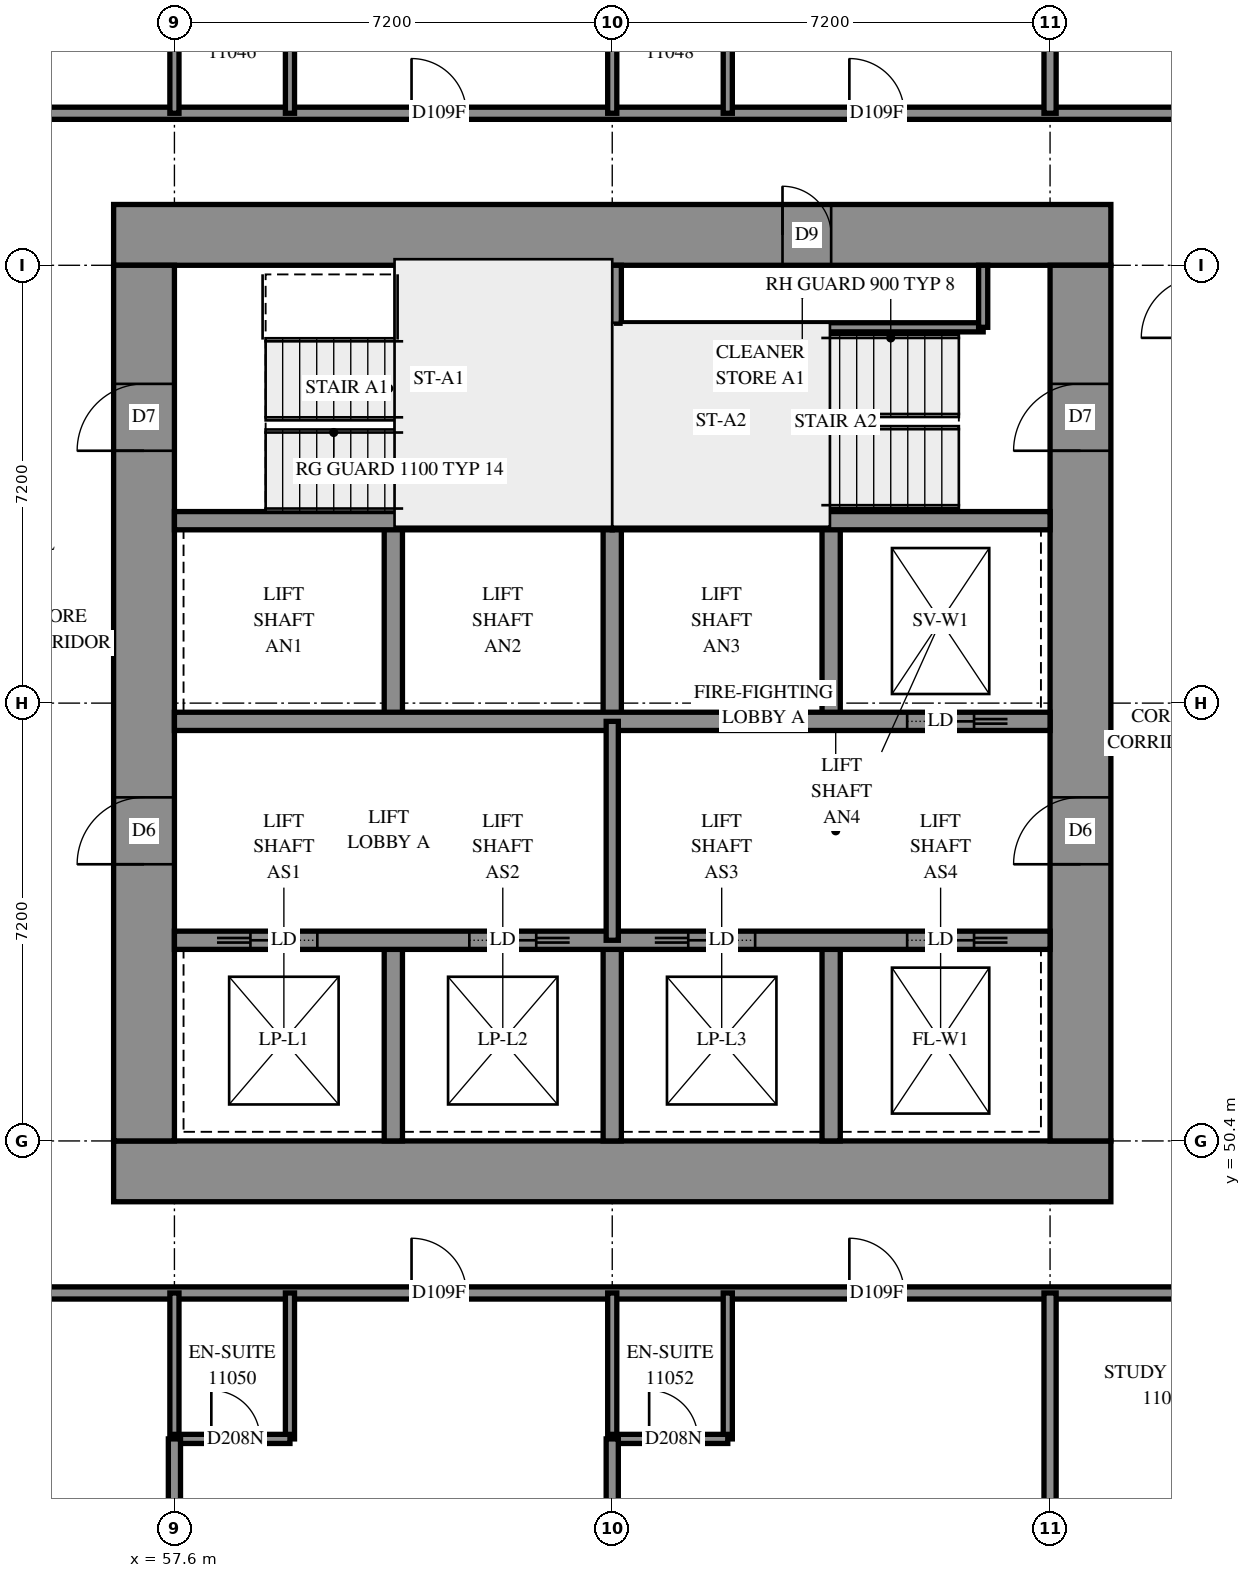
"""IFC4 building model, lengths in metres.
Left out: names, types, materials, properties, quantities, classifications, styles, units other than length and angle.
Written with IfcOpenShell. Run it as: python <this file> out.ifc"""

import sys

from ifc_helpers import new_model, si_unit, direction, frame, frame_2d, origin, place, context, subcontext, project, spatial, rectangle, extrude, element, fill, save


model = new_model("IFC4")
c1 = context("Model", 3, precision=1e-05, world=origin(), true_north=direction((0.0, 1.0)))
c2 = subcontext(c1, "Body", "Model", "MODEL_VIEW")
j1 = project(units=[si_unit("LENGTHUNIT", "METRE"), si_unit("PLANEANGLEUNIT", "RADIAN")], contexts=[c1])
p1 = place(None, origin())
s1 = spatial("IfcSite", under=j1, at=p1, CompositionType="ELEMENT")
p2 = place(p1, origin())
s2 = spatial("IfcBuilding", under=s1, at=p2, CompositionType="ELEMENT")
p3 = place(p2, frame((0.0, 0.0, 44.0)))
s3 = spatial("IfcBuildingStorey", under=s2, at=p3, CompositionType="ELEMENT", Elevation=44.0)
p4 = place(p3, frame((56.6, 49.9, -0.3), z_axis=(0.0, 0.0, 1.0), x_axis=(1.0, 0.0, 0.0)))
e1 = element("IfcWall", 1, at=p4, inside=s3, PredefinedType="SHEAR", context=c2, shape_type="SweptSolid", body=[
    extrude(rectangle(XDim=16.4, YDim=1.0, at=frame_2d((8.2, 0.0))), origin(), (0.0, 0.0, 1.0), 2.7),
])
p5 = place(p3, frame((56.6, 65.3, -0.3), z_axis=(0.0, 0.0, 1.0), x_axis=(1.0, 0.0, 0.0)))
e2 = element("IfcWall", 2, at=p5, inside=s3, PredefinedType="SHEAR", context=c2, shape_type="SweptSolid", body=[
    extrude(rectangle(XDim=16.4, YDim=1.0, at=frame_2d((8.2, 0.0))), origin(), (0.0, 0.0, 1.0), 2.7),
])
p6 = place(p5, frame((11.0, 0.0, 0.3)))
e3 = element("IfcOpeningElement", 3, at=p6, cuts=e2, PredefinedType="OPENING", context=c2, shape_type="SweptSolid", body=[
    extrude(rectangle(XDim=0.8, YDim=2.1, at=frame_2d((0.4, 1.05))), frame((0.0, 0.51, 0.0), z_axis=(0.0, -1.0, 0.0), x_axis=(1.0, 0.0, 0.0)), (0.0, 0.0, 1.0), 1.02),
])
p7 = place(p3, frame((57.1, 50.4, -0.3), z_axis=(0.0, 0.0, 1.0), x_axis=(0.0, 1.0, 0.0)))
e4 = element("IfcWall", 4, at=p7, inside=s3, PredefinedType="SHEAR", context=c2, shape_type="SweptSolid", body=[
    extrude(rectangle(XDim=14.4, YDim=1.0, at=frame_2d((7.2, 0.0))), origin(), (0.0, 0.0, 1.0), 2.7),
])
p8 = place(p7, frame((4.55, 0.0, 0.3)))
e5 = element("IfcOpeningElement", 5, at=p8, cuts=e4, PredefinedType="OPENING", context=c2, shape_type="SweptSolid", body=[
    extrude(rectangle(XDim=1.1, YDim=2.1, at=frame_2d((0.55, 1.05))), frame((0.0, 0.51, 0.0), z_axis=(0.0, -1.0, 0.0), x_axis=(1.0, 0.0, 0.0)), (0.0, 0.0, 1.0), 1.02),
])
p9 = place(p7, frame((11.35, 0.0, 0.3)))
e6 = element("IfcOpeningElement", 6, at=p9, cuts=e4, PredefinedType="OPENING", context=c2, shape_type="SweptSolid", body=[
    extrude(rectangle(XDim=1.1, YDim=2.1, at=frame_2d((0.55, 1.05))), frame((0.0, 0.51, 0.0), z_axis=(0.0, -1.0, 0.0), x_axis=(1.0, 0.0, 0.0)), (0.0, 0.0, 1.0), 1.02),
])
p10 = place(p3, frame((72.5, 50.4, -0.3), z_axis=(0.0, 0.0, 1.0), x_axis=(0.0, 1.0, 0.0)))
e7 = element("IfcWall", 7, at=p10, inside=s3, PredefinedType="SHEAR", context=c2, shape_type="SweptSolid", body=[
    extrude(rectangle(XDim=14.4, YDim=1.0, at=frame_2d((7.2, 0.0))), origin(), (0.0, 0.0, 1.0), 2.7),
])
p11 = place(p10, frame((4.55, 0.0, 0.3)))
e8 = element("IfcOpeningElement", 8, at=p11, cuts=e7, PredefinedType="OPENING", context=c2, shape_type="SweptSolid", body=[
    extrude(rectangle(XDim=1.1, YDim=2.1, at=frame_2d((0.55, 1.05))), frame((0.0, 0.51, 0.0), z_axis=(0.0, -1.0, 0.0), x_axis=(1.0, 0.0, 0.0)), (0.0, 0.0, 1.0), 1.02),
])
p12 = place(p10, frame((11.35, 0.0, 0.3)))
e9 = element("IfcOpeningElement", 9, at=p12, cuts=e7, PredefinedType="OPENING", context=c2, shape_type="SweptSolid", body=[
    extrude(rectangle(XDim=1.1, YDim=2.1, at=frame_2d((0.55, 1.05))), frame((0.0, 0.51, 0.0), z_axis=(0.0, -1.0, 0.0), x_axis=(1.0, 0.0, 0.0)), (0.0, 0.0, 1.0), 1.02),
])
for number, where, z_axis, x_axis in (
    (10, (61.2, 50.4, 0.0), (0.0, 0.0, 1.0), (0.0, 1.0, 0.0)),
    (11, (61.2, 57.3, 0.0), (0.0, 0.0, 1.0), (0.0, 1.0, 0.0)),
    (12, (64.8, 50.4, 0.0), (0.0, 0.0, 1.0), (0.0, 1.0, 0.0)),
    (13, (64.8, 57.3, 0.0), (0.0, 0.0, 1.0), (0.0, 1.0, 0.0)),
    (14, (68.4, 50.4, 0.0), (0.0, 0.0, 1.0), (0.0, 1.0, 0.0)),
    (15, (68.4, 57.3, 0.0), (0.0, 0.0, 1.0), (0.0, 1.0, 0.0)),
):
    element("IfcWall", number, at=place(p3, frame(where, z_axis=z_axis, x_axis=x_axis)), inside=s3, PredefinedType="SOLIDWALL", context=c2, shape_type="SweptSolid", body=[
        extrude(rectangle(XDim=3.3, YDim=0.3, at=frame_2d((1.65, 0.0))), origin(), (0.0, 0.0, 1.0), 3.1),
    ])
p13 = place(p3, frame((57.6, 53.7, 0.0), z_axis=(0.0, 0.0, 1.0), x_axis=(1.0, 0.0, 0.0)))
e16 = element("IfcWall", 16, at=p13, inside=s3, PredefinedType="SOLIDWALL", context=c2, shape_type="SweptSolid", body=[
    extrude(rectangle(XDim=14.4, YDim=0.3, at=frame_2d((7.2, 0.0))), origin(), (0.0, 0.0, 1.0), 3.1),
])
p14 = place(p13, frame((1.25, 0.0, 0.0)))
e17 = element("IfcOpeningElement", 17, at=p14, cuts=e16, PredefinedType="OPENING", context=c2, shape_type="SweptSolid", body=[
    extrude(rectangle(XDim=1.1, YDim=2.1, at=frame_2d((0.55, 1.05))), frame((0.0, 0.16, 0.0), z_axis=(0.0, -1.0, 0.0), x_axis=(1.0, 0.0, 0.0)), (0.0, 0.0, 1.0), 0.32),
])
p15 = place(p13, frame((4.85, 0.0, 0.0)))
e18 = element("IfcOpeningElement", 18, at=p15, cuts=e16, PredefinedType="OPENING", context=c2, shape_type="SweptSolid", body=[
    extrude(rectangle(XDim=1.1, YDim=2.1, at=frame_2d((0.55, 1.05))), frame((0.0, 0.16, 0.0), z_axis=(0.0, -1.0, 0.0), x_axis=(1.0, 0.0, 0.0)), (0.0, 0.0, 1.0), 0.32),
])
p16 = place(p13, frame((8.45, 0.0, 0.0)))
e19 = element("IfcOpeningElement", 19, at=p16, cuts=e16, PredefinedType="OPENING", context=c2, shape_type="SweptSolid", body=[
    extrude(rectangle(XDim=1.1, YDim=2.1, at=frame_2d((0.55, 1.05))), frame((0.0, 0.16, 0.0), z_axis=(0.0, -1.0, 0.0), x_axis=(1.0, 0.0, 0.0)), (0.0, 0.0, 1.0), 0.32),
])
p17 = place(p13, frame((12.05, 0.0, 0.0)))
e20 = element("IfcOpeningElement", 20, at=p17, cuts=e16, PredefinedType="OPENING", context=c2, shape_type="SweptSolid", body=[
    extrude(rectangle(XDim=1.1, YDim=2.1, at=frame_2d((0.55, 1.05))), frame((0.0, 0.16, 0.0), z_axis=(0.0, -1.0, 0.0), x_axis=(1.0, 0.0, 0.0)), (0.0, 0.0, 1.0), 0.32),
])
p18 = place(p3, frame((57.6, 57.3, 0.0), z_axis=(0.0, 0.0, 1.0), x_axis=(1.0, 0.0, 0.0)))
e21 = element("IfcWall", 21, at=p18, inside=s3, PredefinedType="SOLIDWALL", context=c2, shape_type="SweptSolid", body=[
    extrude(rectangle(XDim=14.4, YDim=0.3, at=frame_2d((7.2, 0.0))), origin(), (0.0, 0.0, 1.0), 3.1),
])
p19 = place(p18, frame((12.05, 0.0, 0.0)))
e22 = element("IfcOpeningElement", 22, at=p19, cuts=e21, PredefinedType="OPENING", context=c2, shape_type="SweptSolid", body=[
    extrude(rectangle(XDim=1.1, YDim=2.1, at=frame_2d((0.55, 1.05))), frame((0.0, 0.16, 0.0), z_axis=(0.0, -1.0, 0.0), x_axis=(1.0, 0.0, 0.0)), (0.0, 0.0, 1.0), 0.32),
])
for number, where, z_axis, x_axis in (
    (23, (57.6, 60.6, 0.0), (0.0, 0.0, 1.0), (1.0, 0.0, 0.0)),
    (24, (64.8, 60.6, 0.0), (0.0, 0.0, 1.0), (1.0, 0.0, 0.0)),
):
    element("IfcWall", number, at=place(p3, frame(where, z_axis=z_axis, x_axis=x_axis)), inside=s3, PredefinedType="SOLIDWALL", context=c2, shape_type="SweptSolid", body=[
        extrude(rectangle(XDim=7.2, YDim=0.3, at=frame_2d((3.6, 0.0))), origin(), (0.0, 0.0, 1.0), 3.1),
    ])
p20 = place(p3, frame((64.8, 60.6, 0.0), z_axis=(0.0, 0.0, 1.0), x_axis=(0.0, 1.0, 0.0)))
e25 = element("IfcWall", 25, at=p20, inside=s3, PredefinedType="SOLIDWALL", context=c2, shape_type="SweptSolid", body=[
    extrude(rectangle(XDim=4.2, YDim=0.3, at=frame_2d((2.1, 0.0))), origin(), (0.0, 0.0, 1.0), 3.1),
])
p21 = place(p3, frame((64.95, 63.78, 0.0), z_axis=(0.0, 0.0, 1.0), x_axis=(1.0, 0.0, 0.0)))
e26 = element("IfcWall", 26, at=p21, inside=s3, PredefinedType="PARTITIONING", context=c2, shape_type="SweptSolid", body=[
    extrude(rectangle(XDim=5.95, YDim=0.15, at=frame_2d((2.975, 0.0))), origin(), (0.0, 0.0, 1.0), 3.1),
])
p22 = place(p3, frame((70.9, 63.78, 0.0), z_axis=(0.0, 0.0, 1.0), x_axis=(0.0, 1.0, 0.0)))
e27 = element("IfcWall", 27, at=p22, inside=s3, PredefinedType="PARTITIONING", context=c2, shape_type="SweptSolid", body=[
    extrude(rectangle(XDim=1.02, YDim=0.15, at=frame_2d((0.51, 0.0))), origin(), (0.0, 0.0, 1.0), 3.1),
])
p23 = place(p3, frame((64.8, 53.7, 0.0), z_axis=(0.0, 0.0, 1.0), x_axis=(0.0, 1.0, 0.0)))
e28 = element("IfcWall", 28, at=p23, inside=s3, PredefinedType="PARTITIONING", context=c2, shape_type="SweptSolid", body=[
    extrude(rectangle(XDim=3.6, YDim=0.2, at=frame_2d((1.8, 0.0))), origin(), (0.0, 0.0, 1.0), 3.1),
])
p24 = place(p3, frame((55.1, 67.3, 0.0), z_axis=(0.0, 0.0, 1.0), x_axis=(1.0, 0.0, 0.0)))
e29 = element("IfcWall", 29, at=p24, inside=s3, PredefinedType="PARTITIONING", context=c2, shape_type="SweptSolid", body=[
    extrude(rectangle(XDim=19.4, YDim=0.2, at=frame_2d((9.7, 0.0))), origin(), (0.0, 0.0, 1.0), 3.1),
])
p25 = place(p24, frame((6.399, 0.0, 0.0)))
e30 = element("IfcOpeningElement", 30, at=p25, cuts=e29, PredefinedType="OPENING", context=c2, shape_type="SweptSolid", body=[
    extrude(rectangle(XDim=0.9, YDim=2.1, at=frame_2d((0.45, 1.05))), frame((0.0, 0.11, 0.0), z_axis=(0.0, -1.0, 0.0), x_axis=(1.0, 0.0, 0.0)), (0.0, 0.0, 1.0), 0.22),
])
p26 = place(p24, frame((13.599, 0.0, 0.0)))
e31 = element("IfcOpeningElement", 31, at=p26, cuts=e29, PredefinedType="OPENING", context=c2, shape_type="SweptSolid", body=[
    extrude(rectangle(XDim=0.9, YDim=2.1, at=frame_2d((0.45, 1.05))), frame((0.0, 0.11, 0.0), z_axis=(0.0, -1.0, 0.0), x_axis=(1.0, 0.0, 0.0)), (0.0, 0.0, 1.0), 0.22),
])
p27 = place(p3, frame((55.1, 47.9, 0.0), z_axis=(0.0, 0.0, 1.0), x_axis=(1.0, 0.0, 0.0)))
e32 = element("IfcWall", 32, at=p27, inside=s3, PredefinedType="PARTITIONING", context=c2, shape_type="SweptSolid", body=[
    extrude(rectangle(XDim=19.204, YDim=0.2, at=frame_2d((9.602, 0.0))), origin(), (0.0, 0.0, 1.0), 3.1),
])
p28 = place(p27, frame((6.399, 0.0, 0.0)))
e33 = element("IfcOpeningElement", 33, at=p28, cuts=e32, PredefinedType="OPENING", context=c2, shape_type="SweptSolid", body=[
    extrude(rectangle(XDim=0.9, YDim=2.1, at=frame_2d((0.45, 1.05))), frame((0.0, 0.11, 0.0), z_axis=(0.0, -1.0, 0.0), x_axis=(1.0, 0.0, 0.0)), (0.0, 0.0, 1.0), 0.22),
])
p29 = place(p27, frame((13.599, 0.0, 0.0)))
e34 = element("IfcOpeningElement", 34, at=p29, cuts=e32, PredefinedType="OPENING", context=c2, shape_type="SweptSolid", body=[
    extrude(rectangle(XDim=0.9, YDim=2.1, at=frame_2d((0.45, 1.05))), frame((0.0, 0.11, 0.0), z_axis=(0.0, -1.0, 0.0), x_axis=(1.0, 0.0, 0.0)), (0.0, 0.0, 1.0), 0.22),
])
for number, where, z_axis, x_axis in (
    (35, (72.0, 67.3, 0.0), (0.0, 0.0, 1.0), (0.0, 1.0, 0.0)),
    (36, (72.0, 43.8, 0.0), (0.0, 0.0, 1.0), (0.0, 1.0, 0.0)),
):
    element("IfcWall", number, at=place(p3, frame(where, z_axis=z_axis, x_axis=x_axis)), inside=s3, PredefinedType="PARTITIONING", context=c2, shape_type="SweptSolid", body=[
        extrude(rectangle(XDim=4.1, YDim=0.2, at=frame_2d((2.05, 0.0))), origin(), (0.0, 0.0, 1.0), 3.1),
    ])
for number, where, z_axis, x_axis in (
    (37, (59.5, 67.3, 0.0), (0.0, 0.0, 1.0), (0.0, 1.0, 0.0)),
    (38, (57.6, 67.3, 0.0), (0.0, 0.0, 1.0), (0.0, 1.0, 0.0)),
    (39, (66.7, 67.3, 0.0), (0.0, 0.0, 1.0), (0.0, 1.0, 0.0)),
    (40, (64.8, 67.3, 0.0), (0.0, 0.0, 1.0), (0.0, 1.0, 0.0)),
    (41, (59.5, 45.5, 0.0), (0.0, 0.0, 1.0), (0.0, 1.0, 0.0)),
    (42, (57.6, 45.5, 0.0), (0.0, 0.0, 1.0), (0.0, 1.0, 0.0)),
    (43, (66.7, 45.5, 0.0), (0.0, 0.0, 1.0), (0.0, 1.0, 0.0)),
    (44, (64.8, 45.5, 0.0), (0.0, 0.0, 1.0), (0.0, 1.0, 0.0)),
):
    element("IfcWall", number, at=place(p3, frame(where, z_axis=z_axis, x_axis=x_axis)), inside=s3, PredefinedType="PARTITIONING", context=c2, shape_type="SweptSolid", body=[
        extrude(rectangle(XDim=2.4, YDim=0.15, at=frame_2d((1.2, 0.0))), origin(), (0.0, 0.0, 1.0), 3.1),
    ])
p30 = place(p3, frame((64.8, 45.5, 0.0), z_axis=(0.0, 0.0, 1.0), x_axis=(1.0, 0.0, 0.0)))
e45 = element("IfcWall", 45, at=p30, inside=s3, PredefinedType="PARTITIONING", context=c2, shape_type="SweptSolid", body=[
    extrude(rectangle(XDim=1.9, YDim=0.15, at=frame_2d((0.95, 0.0))), origin(), (0.0, 0.0, 1.0), 3.1),
])
p31 = place(p30, frame((0.607, 0.0, 0.0)))
e46 = element("IfcOpeningElement", 46, at=p31, cuts=e45, PredefinedType="OPENING", context=c2, shape_type="SweptSolid", body=[
    extrude(rectangle(XDim=0.8, YDim=2.1, at=frame_2d((0.4, 1.05))), frame((0.0, 0.085, 0.0), z_axis=(0.0, -1.0, 0.0), x_axis=(1.0, 0.0, 0.0)), (0.0, 0.0, 1.0), 0.17),
])
p32 = place(p3, frame((57.6, 45.5, 0.0), z_axis=(0.0, 0.0, 1.0), x_axis=(1.0, 0.0, 0.0)))
e47 = element("IfcWall", 47, at=p32, inside=s3, PredefinedType="PARTITIONING", context=c2, shape_type="SweptSolid", body=[
    extrude(rectangle(XDim=1.9, YDim=0.15, at=frame_2d((0.95, 0.0))), origin(), (0.0, 0.0, 1.0), 3.1),
])
p33 = place(p32, frame((0.607, 0.0, 0.0)))
e48 = element("IfcOpeningElement", 48, at=p33, cuts=e47, PredefinedType="OPENING", context=c2, shape_type="SweptSolid", body=[
    extrude(rectangle(XDim=0.8, YDim=2.1, at=frame_2d((0.4, 1.05))), frame((0.0, 0.085, 0.0), z_axis=(0.0, -1.0, 0.0), x_axis=(1.0, 0.0, 0.0)), (0.0, 0.0, 1.0), 0.17),
])
for number, where, z_axis, x_axis in (
    (49, (57.6, 43.8, 0.0), (0.0, 0.0, 1.0), (0.0, 1.0, 0.0)),
    (50, (64.8, 43.8, 0.0), (0.0, 0.0, 1.0), (0.0, 1.0, 0.0)),
):
    element("IfcWall", number, at=place(p3, frame(where, z_axis=z_axis, x_axis=x_axis)), inside=s3, PredefinedType="PARTITIONING", context=c2, shape_type="SweptSolid", body=[
        extrude(rectangle(XDim=1.7, YDim=0.2, at=frame_2d((0.85, 0.0))), origin(), (0.0, 0.0, 1.0), 3.1),
    ])
p34 = place(p6, origin())
e51 = element("IfcDoor", 51, at=p34, inside=s3, OperationType="SINGLE_SWING_RIGHT", PredefinedType="DOOR", context=c2, shape_type="SweptSolid", body=[
    extrude(rectangle(XDim=0.8, YDim=2.1, at=frame_2d((0.4, 1.05))), frame((0.0, -0.44, 0.0), z_axis=(0.0, -1.0, 0.0), x_axis=(1.0, 0.0, 0.0)), (0.0, 0.0, 1.0), 0.05),
])
fill(e3, e51)
p35 = place(p8, origin())
e52 = element("IfcDoor", 52, at=p35, inside=s3, OperationType="DOUBLE_DOOR_SINGLE_SWING", PredefinedType="DOOR", context=c2, shape_type="SweptSolid", body=[
    extrude(rectangle(XDim=1.1, YDim=2.1, at=frame_2d((0.55, 1.05))), frame((0.0, 0.025, 0.0), z_axis=(0.0, -1.0, 0.0), x_axis=(1.0, 0.0, 0.0)), (0.0, 0.0, 1.0), 0.05),
])
fill(e5, e52)
p36 = place(p11, origin())
e53 = element("IfcDoor", 53, at=p36, inside=s3, OperationType="DOUBLE_DOOR_SINGLE_SWING", PredefinedType="DOOR", context=c2, shape_type="SweptSolid", body=[
    extrude(rectangle(XDim=1.1, YDim=2.1, at=frame_2d((0.55, 1.05))), frame((0.0, 0.025, 0.0), z_axis=(0.0, -1.0, 0.0), x_axis=(1.0, 0.0, 0.0)), (0.0, 0.0, 1.0), 0.05),
])
fill(e8, e53)
p37 = place(p9, origin())
e54 = element("IfcDoor", 54, at=p37, inside=s3, OperationType="SINGLE_SWING_LEFT", PredefinedType="DOOR", context=c2, shape_type="SweptSolid", body=[
    extrude(rectangle(XDim=1.1, YDim=2.1, at=frame_2d((0.55, 1.05))), frame((0.0, 0.025, 0.0), z_axis=(0.0, -1.0, 0.0), x_axis=(1.0, 0.0, 0.0)), (0.0, 0.0, 1.0), 0.05),
])
fill(e6, e54)
p38 = place(p12, origin())
e55 = element("IfcDoor", 55, at=p38, inside=s3, OperationType="SINGLE_SWING_RIGHT", PredefinedType="DOOR", context=c2, shape_type="SweptSolid", body=[
    extrude(rectangle(XDim=1.1, YDim=2.1, at=frame_2d((0.55, 1.05))), frame((0.0, 0.025, 0.0), z_axis=(0.0, -1.0, 0.0), x_axis=(1.0, 0.0, 0.0)), (0.0, 0.0, 1.0), 0.05),
])
fill(e9, e55)
p39 = place(p14, origin())
e56 = element("IfcDoor", 56, at=p39, inside=s3, OperationType="SLIDING_TO_LEFT", PredefinedType="DOOR", context=c2, shape_type="SweptSolid", body=[
    extrude(rectangle(XDim=1.1, YDim=2.1, at=frame_2d((0.55, 1.05))), frame((0.0, 0.025, 0.0), z_axis=(0.0, -1.0, 0.0), x_axis=(1.0, 0.0, 0.0)), (0.0, 0.0, 1.0), 0.05),
])
fill(e17, e56)
p40 = place(p15, origin())
e57 = element("IfcDoor", 57, at=p40, inside=s3, OperationType="SLIDING_TO_RIGHT", PredefinedType="DOOR", context=c2, shape_type="SweptSolid", body=[
    extrude(rectangle(XDim=1.1, YDim=2.1, at=frame_2d((0.55, 1.05))), frame((0.0, 0.025, 0.0), z_axis=(0.0, -1.0, 0.0), x_axis=(1.0, 0.0, 0.0)), (0.0, 0.0, 1.0), 0.05),
])
fill(e18, e57)
p41 = place(p16, origin())
e58 = element("IfcDoor", 58, at=p41, inside=s3, OperationType="SLIDING_TO_LEFT", PredefinedType="DOOR", context=c2, shape_type="SweptSolid", body=[
    extrude(rectangle(XDim=1.1, YDim=2.1, at=frame_2d((0.55, 1.05))), frame((0.0, 0.025, 0.0), z_axis=(0.0, -1.0, 0.0), x_axis=(1.0, 0.0, 0.0)), (0.0, 0.0, 1.0), 0.05),
])
fill(e19, e58)
p42 = place(p17, origin())
e59 = element("IfcDoor", 59, at=p42, inside=s3, OperationType="SLIDING_TO_RIGHT", PredefinedType="DOOR", context=c2, shape_type="SweptSolid", body=[
    extrude(rectangle(XDim=1.1, YDim=2.1, at=frame_2d((0.55, 1.05))), frame((0.0, 0.025, 0.0), z_axis=(0.0, -1.0, 0.0), x_axis=(1.0, 0.0, 0.0)), (0.0, 0.0, 1.0), 0.05),
])
fill(e20, e59)
p43 = place(p19, origin())
e60 = element("IfcDoor", 60, at=p43, inside=s3, OperationType="SLIDING_TO_RIGHT", PredefinedType="DOOR", context=c2, shape_type="SweptSolid", body=[
    extrude(rectangle(XDim=1.1, YDim=2.1, at=frame_2d((0.55, 1.05))), frame((0.0, 0.025, 0.0), z_axis=(0.0, -1.0, 0.0), x_axis=(1.0, 0.0, 0.0)), (0.0, 0.0, 1.0), 0.05),
])
fill(e22, e60)
p44 = place(p25, origin())
e61 = element("IfcDoor", 61, at=p44, inside=s3, OperationType="SINGLE_SWING_RIGHT", PredefinedType="DOOR", context=c2, shape_type="SweptSolid", body=[
    extrude(rectangle(XDim=0.9, YDim=2.1, at=frame_2d((0.45, 1.05))), frame((0.0, 0.025, 0.0), z_axis=(0.0, -1.0, 0.0), x_axis=(1.0, 0.0, 0.0)), (0.0, 0.0, 1.0), 0.05),
])
fill(e30, e61)
p45 = place(p26, origin())
e62 = element("IfcDoor", 62, at=p45, inside=s3, OperationType="SINGLE_SWING_RIGHT", PredefinedType="DOOR", context=c2, shape_type="SweptSolid", body=[
    extrude(rectangle(XDim=0.9, YDim=2.1, at=frame_2d((0.45, 1.05))), frame((0.0, 0.025, 0.0), z_axis=(0.0, -1.0, 0.0), x_axis=(1.0, 0.0, 0.0)), (0.0, 0.0, 1.0), 0.05),
])
fill(e31, e62)
p46 = place(p28, origin())
e63 = element("IfcDoor", 63, at=p46, inside=s3, OperationType="SINGLE_SWING_LEFT", PredefinedType="DOOR", context=c2, shape_type="SweptSolid", body=[
    extrude(rectangle(XDim=0.9, YDim=2.1, at=frame_2d((0.45, 1.05))), frame((0.0, 0.025, 0.0), z_axis=(0.0, -1.0, 0.0), x_axis=(1.0, 0.0, 0.0)), (0.0, 0.0, 1.0), 0.05),
])
fill(e33, e63)
p47 = place(p33, origin())
e64 = element("IfcDoor", 64, at=p47, inside=s3, OperationType="SINGLE_SWING_RIGHT", PredefinedType="DOOR", context=c2, shape_type="SweptSolid", body=[
    extrude(rectangle(XDim=0.8, YDim=2.1, at=frame_2d((0.4, 1.05))), frame((0.0, 0.025, 0.0), z_axis=(0.0, -1.0, 0.0), x_axis=(1.0, 0.0, 0.0)), (0.0, 0.0, 1.0), 0.05),
])
fill(e48, e64)
p48 = place(p29, origin())
e65 = element("IfcDoor", 65, at=p48, inside=s3, OperationType="SINGLE_SWING_LEFT", PredefinedType="DOOR", context=c2, shape_type="SweptSolid", body=[
    extrude(rectangle(XDim=0.9, YDim=2.1, at=frame_2d((0.45, 1.05))), frame((0.0, 0.025, 0.0), z_axis=(0.0, -1.0, 0.0), x_axis=(1.0, 0.0, 0.0)), (0.0, 0.0, 1.0), 0.05),
])
fill(e34, e65)
p49 = place(p31, origin())
e66 = element("IfcDoor", 66, at=p49, inside=s3, OperationType="SINGLE_SWING_RIGHT", PredefinedType="DOOR", context=c2, shape_type="SweptSolid", body=[
    extrude(rectangle(XDim=0.8, YDim=2.1, at=frame_2d((0.4, 1.05))), frame((0.0, 0.025, 0.0), z_axis=(0.0, -1.0, 0.0), x_axis=(1.0, 0.0, 0.0)), (0.0, 0.0, 1.0), 0.05),
])
fill(e46, e66)
save(model, sys.argv[1])
